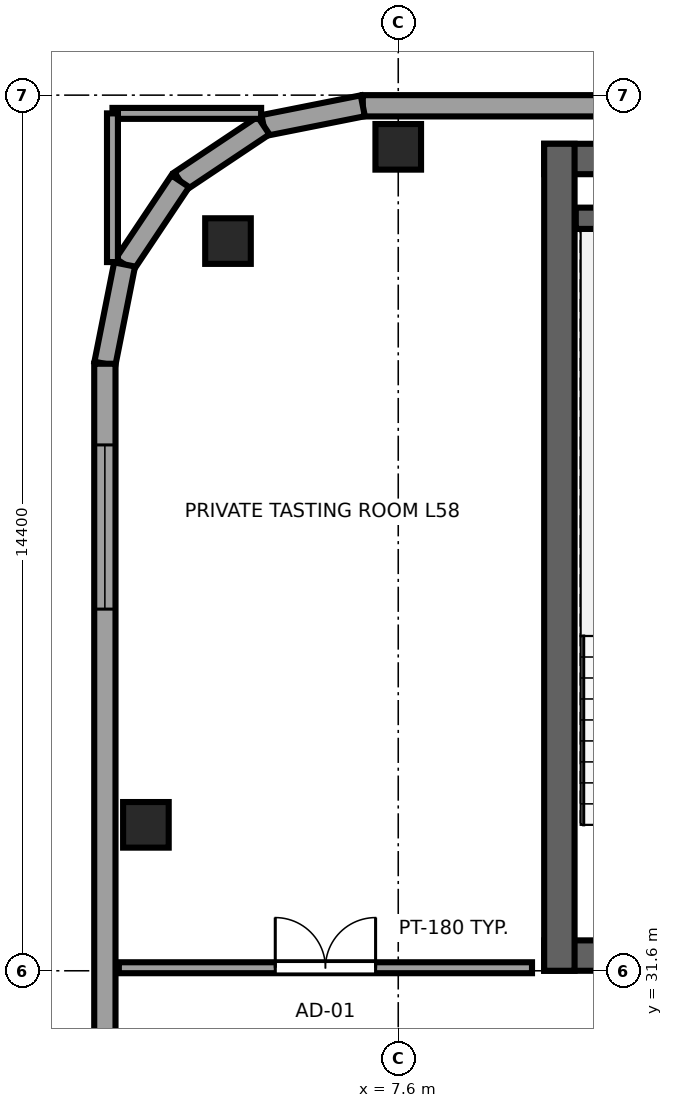
"""IFC4 building model, lengths in metres.
Left out: names, types, materials, properties, quantities, classifications, styles, units other than length and angle.
Written with IfcOpenShell. Run it as: python <this file> out.ifc"""

import sys

from ifc_helpers import new_model, si_unit, direction, frame, frame_2d, origin, origin_2d, place, context, subcontext, project, spatial, rectangle, extrude, source, transform, mapped, element, fill, save


model = new_model("IFC4")
c1 = context("Model", 3, precision=1e-05, world=origin(), true_north=direction((0.0, 1.0)))
c2 = subcontext(c1, "Body", "Model", "MODEL_VIEW")
j1 = project(units=[si_unit("LENGTHUNIT", "METRE"), si_unit("PLANEANGLEUNIT", "RADIAN")], contexts=[c1])
p1 = place(None, origin())
s1 = spatial("IfcSite", under=j1, at=p1, CompositionType="ELEMENT")
p2 = place(p1, origin())
s2 = spatial("IfcBuilding", under=s1, at=p2, CompositionType="ELEMENT")
p3 = place(p2, frame((0.0, 0.0, 220.35)))
s3 = spatial("IfcBuildingStorey", under=s2, at=p3, CompositionType="ELEMENT", Elevation=220.35)
p4 = place(p3, frame((10.0, 31.85, 0.0), z_axis=(0.0, 0.0, 1.0), x_axis=(1.0, 0.0, 0.0)))
e1 = element("IfcWall", 1, at=p4, inside=s3, PredefinedType="SHEAR", context=c2, shape_type="SweptSolid", body=[
    extrude(rectangle(XDim=26.0, YDim=0.5, at=frame_2d((13.0, 0.0))), origin(), (0.0, 0.0, 1.0), 3.55),
])
p5 = place(p4, frame((7.45, 0.0, 0.0), z_axis=(0.0, 0.0, 1.0), x_axis=(-1.0, 0.0, 0.0)))
e2 = element("IfcOpeningElement", 2, at=p5, cuts=e1, PredefinedType="OPENING", context=c2, shape_type="SweptSolid", body=[
    extrude(rectangle(XDim=1.5, YDim=2.04, at=frame_2d((0.75, 1.02))), frame((0.0, 0.26, 0.0), z_axis=(0.0, -1.0, 0.0), x_axis=(1.0, 0.0, 0.0)), (0.0, 0.0, 1.0), 0.52),
])
p6 = place(p4, frame((13.75, 0.0, 0.0), z_axis=(0.0, 0.0, 1.0), x_axis=(-1.0, 0.0, 0.0)))
e3 = element("IfcOpeningElement", 3, at=p6, cuts=e1, PredefinedType="OPENING", context=c2, shape_type="SweptSolid", body=[
    extrude(rectangle(XDim=1.5, YDim=2.04, at=frame_2d((0.75, 1.02))), frame((0.0, 0.26, 0.0), z_axis=(0.0, -1.0, 0.0), x_axis=(1.0, 0.0, 0.0)), (0.0, 0.0, 1.0), 0.52),
])
p7 = place(p4, frame((20.05, 0.0, 0.0), z_axis=(0.0, 0.0, 1.0), x_axis=(-1.0, 0.0, 0.0)))
e4 = element("IfcOpeningElement", 4, at=p7, cuts=e1, PredefinedType="OPENING", context=c2, shape_type="SweptSolid", body=[
    extrude(rectangle(XDim=1.5, YDim=2.04, at=frame_2d((0.75, 1.02))), frame((0.0, 0.26, 0.0), z_axis=(0.0, -1.0, 0.0), x_axis=(1.0, 0.0, 0.0)), (0.0, 0.0, 1.0), 0.52),
])
p8 = place(p3, frame((10.0, 44.95, 0.0), z_axis=(0.0, 0.0, 1.0), x_axis=(1.0, 0.0, 0.0)))
e5 = element("IfcWall", 5, at=p8, inside=s3, PredefinedType="SHEAR", context=c2, shape_type="SweptSolid", body=[
    extrude(rectangle(XDim=26.0, YDim=0.5, at=frame_2d((13.0, 0.0))), origin(), (0.0, 0.0, 1.0), 3.55),
])
p9 = place(p3, frame((10.25, 31.6, 0.0), z_axis=(0.0, 0.0, 1.0), x_axis=(0.0, 1.0, 0.0)))
e6 = element("IfcWall", 6, at=p9, inside=s3, PredefinedType="SHEAR", context=c2, shape_type="SweptSolid", body=[
    extrude(rectangle(XDim=13.6, YDim=0.5, at=frame_2d((6.8, 0.0))), origin(), (0.0, 0.0, 1.0), 3.55),
])
p10 = place(p3, frame((10.52, 43.975, 0.0), z_axis=(0.0, 0.0, 1.0), x_axis=(1.0, 0.0, 0.0)))
e7 = element("IfcWall", 7, at=p10, inside=s3, PredefinedType="SHEAR", context=c2, shape_type="SweptSolid", body=[
    extrude(rectangle(XDim=3.6, YDim=0.35, at=frame_2d((1.8, 0.0))), origin(), (0.0, 0.0, 1.0), 3.55),
])
m1 = source(origin(), c2, "Body", "SweptSolid", [
    extrude(rectangle(XDim=0.75, YDim=0.75, at=origin_2d()), origin(), (0.0, 0.0, 1.0), 3.55),
])
for number, where, z_axis, x_axis in (
    (8, (4.8, 43.6, 0.0), (0.0, 0.0, 1.0), (1.0, 0.0, 0.0)),
    (9, (7.6, 45.15, 0.0), (0.0, 0.0, 1.0), (1.0, 0.0, 0.0)),
    (10, (3.45, 34.0, 0.0), (0.0, 0.0, 1.0), (1.0, 0.0, 0.0)),
):
    element("IfcColumn", number, at=place(p3, frame(where, z_axis=z_axis, x_axis=x_axis)), inside=s3, PredefinedType="COLUMN", context=c2, shape_type="MappedRepresentation", body=[
        mapped(m1, transform((0.0, 0.0, 0.0), x_axis=(1.0, 0.0, 0.0), y_axis=(0.0, 1.0, 0.0), z_axis=(0.0, 0.0, 1.0), scale=1.0)),
    ])
p11 = place(p3, frame((35.383, 45.825, 0.0), z_axis=(0.0, 0.0, 1.0), x_axis=(-1.0, 0.0, 0.0)))
e11 = element("IfcWall", 11, at=p11, inside=s3, PredefinedType="SOLIDWALL", context=c2, shape_type="SweptSolid", body=[
    extrude(rectangle(XDim=28.366, YDim=0.35, at=frame_2d((14.183, 0.0))), origin(), (0.0, 0.0, 1.0), 3.37),
])
p12 = place(p11, frame((1.514, 0.0, 0.68)))
e12 = element("IfcOpeningElement", 12, at=p12, cuts=e11, PredefinedType="OPENING", context=c2, shape_type="SweptSolid", body=[
    extrude(rectangle(XDim=2.7, YDim=1.95, at=frame_2d((1.35, 0.975))), frame((0.0, 0.185, 0.0), z_axis=(0.0, -1.0, 0.0), x_axis=(1.0, 0.0, 0.0)), (0.0, 0.0, 1.0), 0.37),
])
p13 = place(p11, frame((6.041, 0.0, 0.68)))
e13 = element("IfcOpeningElement", 13, at=p13, cuts=e11, PredefinedType="OPENING", context=c2, shape_type="SweptSolid", body=[
    extrude(rectangle(XDim=2.7, YDim=1.95, at=frame_2d((1.35, 0.975))), frame((0.0, 0.185, 0.0), z_axis=(0.0, -1.0, 0.0), x_axis=(1.0, 0.0, 0.0)), (0.0, 0.0, 1.0), 0.37),
])
p14 = place(p11, frame((10.569, 0.0, 0.68)))
e14 = element("IfcOpeningElement", 14, at=p14, cuts=e11, PredefinedType="OPENING", context=c2, shape_type="SweptSolid", body=[
    extrude(rectangle(XDim=2.7, YDim=1.95, at=frame_2d((1.35, 0.975))), frame((0.0, 0.185, 0.0), z_axis=(0.0, -1.0, 0.0), x_axis=(1.0, 0.0, 0.0)), (0.0, 0.0, 1.0), 0.37),
])
p15 = place(p11, frame((15.097, 0.0, 0.68)))
e15 = element("IfcOpeningElement", 15, at=p15, cuts=e11, PredefinedType="OPENING", context=c2, shape_type="SweptSolid", body=[
    extrude(rectangle(XDim=2.7, YDim=1.95, at=frame_2d((1.35, 0.975))), frame((0.0, 0.185, 0.0), z_axis=(0.0, -1.0, 0.0), x_axis=(1.0, 0.0, 0.0)), (0.0, 0.0, 1.0), 0.37),
])
p16 = place(p11, frame((19.624, 0.0, 0.68)))
e16 = element("IfcOpeningElement", 16, at=p16, cuts=e11, PredefinedType="OPENING", context=c2, shape_type="SweptSolid", body=[
    extrude(rectangle(XDim=2.7, YDim=1.95, at=frame_2d((1.35, 0.975))), frame((0.0, 0.185, 0.0), z_axis=(0.0, -1.0, 0.0), x_axis=(1.0, 0.0, 0.0)), (0.0, 0.0, 1.0), 0.37),
])
p17 = place(p3, frame((7.017, 45.825, 0.0), z_axis=(0.0, 0.0, 1.0), x_axis=(-0.980788844421, -0.195072403631, 0.0)))
e17 = element("IfcWall", 17, at=p17, inside=s3, PredefinedType="SOLIDWALL", context=c2, shape_type="SweptSolid", body=[
    extrude(rectangle(XDim=1.665, YDim=0.35, at=frame_2d((0.832, 0.0))), origin(), (0.0, 0.0, 1.0), 3.37),
])
for number, where, z_axis, x_axis in (
    (18, (5.385, 45.5, 0.0), (0.0, 0.0, 1.0), (-0.832, -0.556, 0.0)),
    (19, (4.015, 44.585, 0.0), (0.0, 0.0, 1.0), (-0.556, -0.831, 0.0)),
):
    element("IfcWall", number, at=place(p3, frame(where, z_axis=z_axis, x_axis=x_axis)), inside=s3, PredefinedType="SOLIDWALL", context=c2, shape_type="SweptSolid", body=[
        extrude(rectangle(XDim=1.647, YDim=0.35, at=frame_2d((0.824, 0.0))), origin(), (0.0, 0.0, 1.0), 2.9),
    ])
p18 = place(p3, frame((3.1, 43.216, 0.0), z_axis=(0.0, 0.0, 1.0), x_axis=(-0.195044345786, -0.980794424524, 0.0)))
e20 = element("IfcWall", 20, at=p18, inside=s3, PredefinedType="SOLIDWALL", context=c2, shape_type="SweptSolid", body=[
    extrude(rectangle(XDim=1.665, YDim=0.35, at=frame_2d((0.833, 0.0))), origin(), (0.0, 0.0, 1.0), 3.37),
])
p19 = place(p3, frame((2.775, 41.583, 0.0), z_axis=(0.0, 0.0, 1.0), x_axis=(0.0, -1.0, 0.0)))
e21 = element("IfcWall", 21, at=p19, inside=s3, PredefinedType="SOLIDWALL", context=c2, shape_type="SweptSolid", body=[
    extrude(rectangle(XDim=34.566, YDim=0.35, at=frame_2d((17.283, 0.0))), origin(), (0.0, 0.0, 1.0), 3.37),
])
p20 = place(p19, frame((1.335, 0.0, 0.68)))
e22 = element("IfcOpeningElement", 22, at=p20, cuts=e21, PredefinedType="OPENING", context=c2, shape_type="SweptSolid", body=[
    extrude(rectangle(XDim=2.7, YDim=1.95, at=frame_2d((1.35, 0.975))), frame((0.0, 0.185, 0.0), z_axis=(0.0, -1.0, 0.0), x_axis=(1.0, 0.0, 0.0)), (0.0, 0.0, 1.0), 0.37),
])
p21 = place(p19, frame((13.847, 0.0, 0.68)))
e23 = element("IfcOpeningElement", 23, at=p21, cuts=e21, PredefinedType="OPENING", context=c2, shape_type="SweptSolid", body=[
    extrude(rectangle(XDim=2.7, YDim=1.95, at=frame_2d((1.35, 0.975))), frame((0.0, 0.185, 0.0), z_axis=(0.0, -1.0, 0.0), x_axis=(1.0, 0.0, 0.0)), (0.0, 0.0, 1.0), 0.37),
])
p22 = place(p19, frame((18.018, 0.0, 0.68)))
e24 = element("IfcOpeningElement", 24, at=p22, cuts=e21, PredefinedType="OPENING", context=c2, shape_type="SweptSolid", body=[
    extrude(rectangle(XDim=2.7, YDim=1.95, at=frame_2d((1.35, 0.975))), frame((0.0, 0.185, 0.0), z_axis=(0.0, -1.0, 0.0), x_axis=(1.0, 0.0, 0.0)), (0.0, 0.0, 1.0), 0.37),
])
p23 = place(p19, frame((22.189, 0.0, 0.68)))
e25 = element("IfcOpeningElement", 25, at=p23, cuts=e21, PredefinedType="OPENING", context=c2, shape_type="SweptSolid", body=[
    extrude(rectangle(XDim=2.7, YDim=1.95, at=frame_2d((1.35, 0.975))), frame((0.0, 0.185, 0.0), z_axis=(0.0, -1.0, 0.0), x_axis=(1.0, 0.0, 0.0)), (0.0, 0.0, 1.0), 0.37),
])
p24 = place(p19, frame((29.98, 0.0, 0.68)))
e26 = element("IfcOpeningElement", 26, at=p24, cuts=e21, PredefinedType="OPENING", context=c2, shape_type="SweptSolid", body=[
    extrude(rectangle(XDim=2.7, YDim=1.95, at=frame_2d((1.35, 0.975))), frame((0.0, 0.185, 0.0), z_axis=(0.0, -1.0, 0.0), x_axis=(1.0, 0.0, 0.0)), (0.0, 0.0, 1.0), 0.37),
])
p25 = place(p3, frame((3.005, 31.65, 0.0), z_axis=(0.0, 0.0, 1.0), x_axis=(1.0, 0.0, 0.0)))
e27 = element("IfcWall", 27, at=p25, inside=s3, PredefinedType="PARTITIONING", context=c2, shape_type="SweptSolid", body=[
    extrude(rectangle(XDim=6.795, YDim=0.18, at=frame_2d((3.397, 0.0))), origin(), (0.0, 0.0, 1.0), 3.37),
])
p26 = place(p25, frame((2.573, 0.0, 0.0)))
e28 = element("IfcOpeningElement", 28, at=p26, cuts=e27, PredefinedType="OPENING", context=c2, shape_type="SweptSolid", body=[
    extrude(rectangle(XDim=1.65, YDim=2.15, at=frame_2d((0.825, 1.075))), frame((0.0, 0.1, 0.0), z_axis=(0.0, -1.0, 0.0), x_axis=(1.0, 0.0, 0.0)), (0.0, 0.0, 1.0), 0.2),
])
for number, where, z_axis, x_axis in (
    (29, (2.9, 45.7, 0.0), (0.0, 0.0, 1.0), (1.0, 0.0, 0.0)),
    (30, (2.9, 43.255, 0.0), (0.0, 0.0, 1.0), (0.0, 1.0, 0.0)),
):
    element("IfcWall", number, at=place(p3, frame(where, z_axis=z_axis, x_axis=x_axis)), inside=s3, PredefinedType="PARTITIONING", context=c2, shape_type="SweptSolid", body=[
        extrude(rectangle(XDim=2.445, YDim=0.18, at=frame_2d((1.223, 0.0))), origin(), (0.0, 0.0, 1.0), 3.37),
    ])
m2 = source(origin(), c2, "Body", "SweptSolid", [
    extrude(rectangle(XDim=2.7, YDim=1.95, at=frame_2d((1.35, 0.975))), frame((0.0, 0.09, 0.0), z_axis=(0.0, -1.0, 0.0), x_axis=(1.0, 0.0, 0.0)), (0.0, 0.0, 1.0), 0.06),
])
p27 = place(p20, origin())
e31 = element("IfcWindow", 31, at=p27, inside=s3, PartitioningType="TRIPLE_PANEL_HORIZONTAL", PredefinedType="WINDOW", context=c2, shape_type="MappedRepresentation", body=[
    mapped(m2, transform((0.0, 0.0, 0.0), x_axis=(1.0, 0.0, 0.0), y_axis=(0.0, 1.0, 0.0), z_axis=(0.0, 0.0, 1.0), scale=1.0)),
])
fill(e22, e31)
m3 = source(origin(), c2, "Body", "SweptSolid", [
    extrude(rectangle(XDim=1.65, YDim=2.15, at=frame_2d((0.825, 1.075))), frame((0.0, 0.025, 0.0), z_axis=(0.0, -1.0, 0.0), x_axis=(1.0, 0.0, 0.0)), (0.0, 0.0, 1.0), 0.05),
])
p28 = place(p26, origin())
e32 = element("IfcDoor", 32, at=p28, inside=s3, OperationType="DOUBLE_DOOR_SINGLE_SWING", PredefinedType="DOOR", context=c2, shape_type="MappedRepresentation", body=[
    mapped(m3, transform((0.0, 0.0, 0.0), x_axis=(1.0, 0.0, 0.0), y_axis=(0.0, 1.0, 0.0), z_axis=(0.0, 0.0, 1.0), scale=1.0)),
])
fill(e28, e32)
save(model, sys.argv[1])
